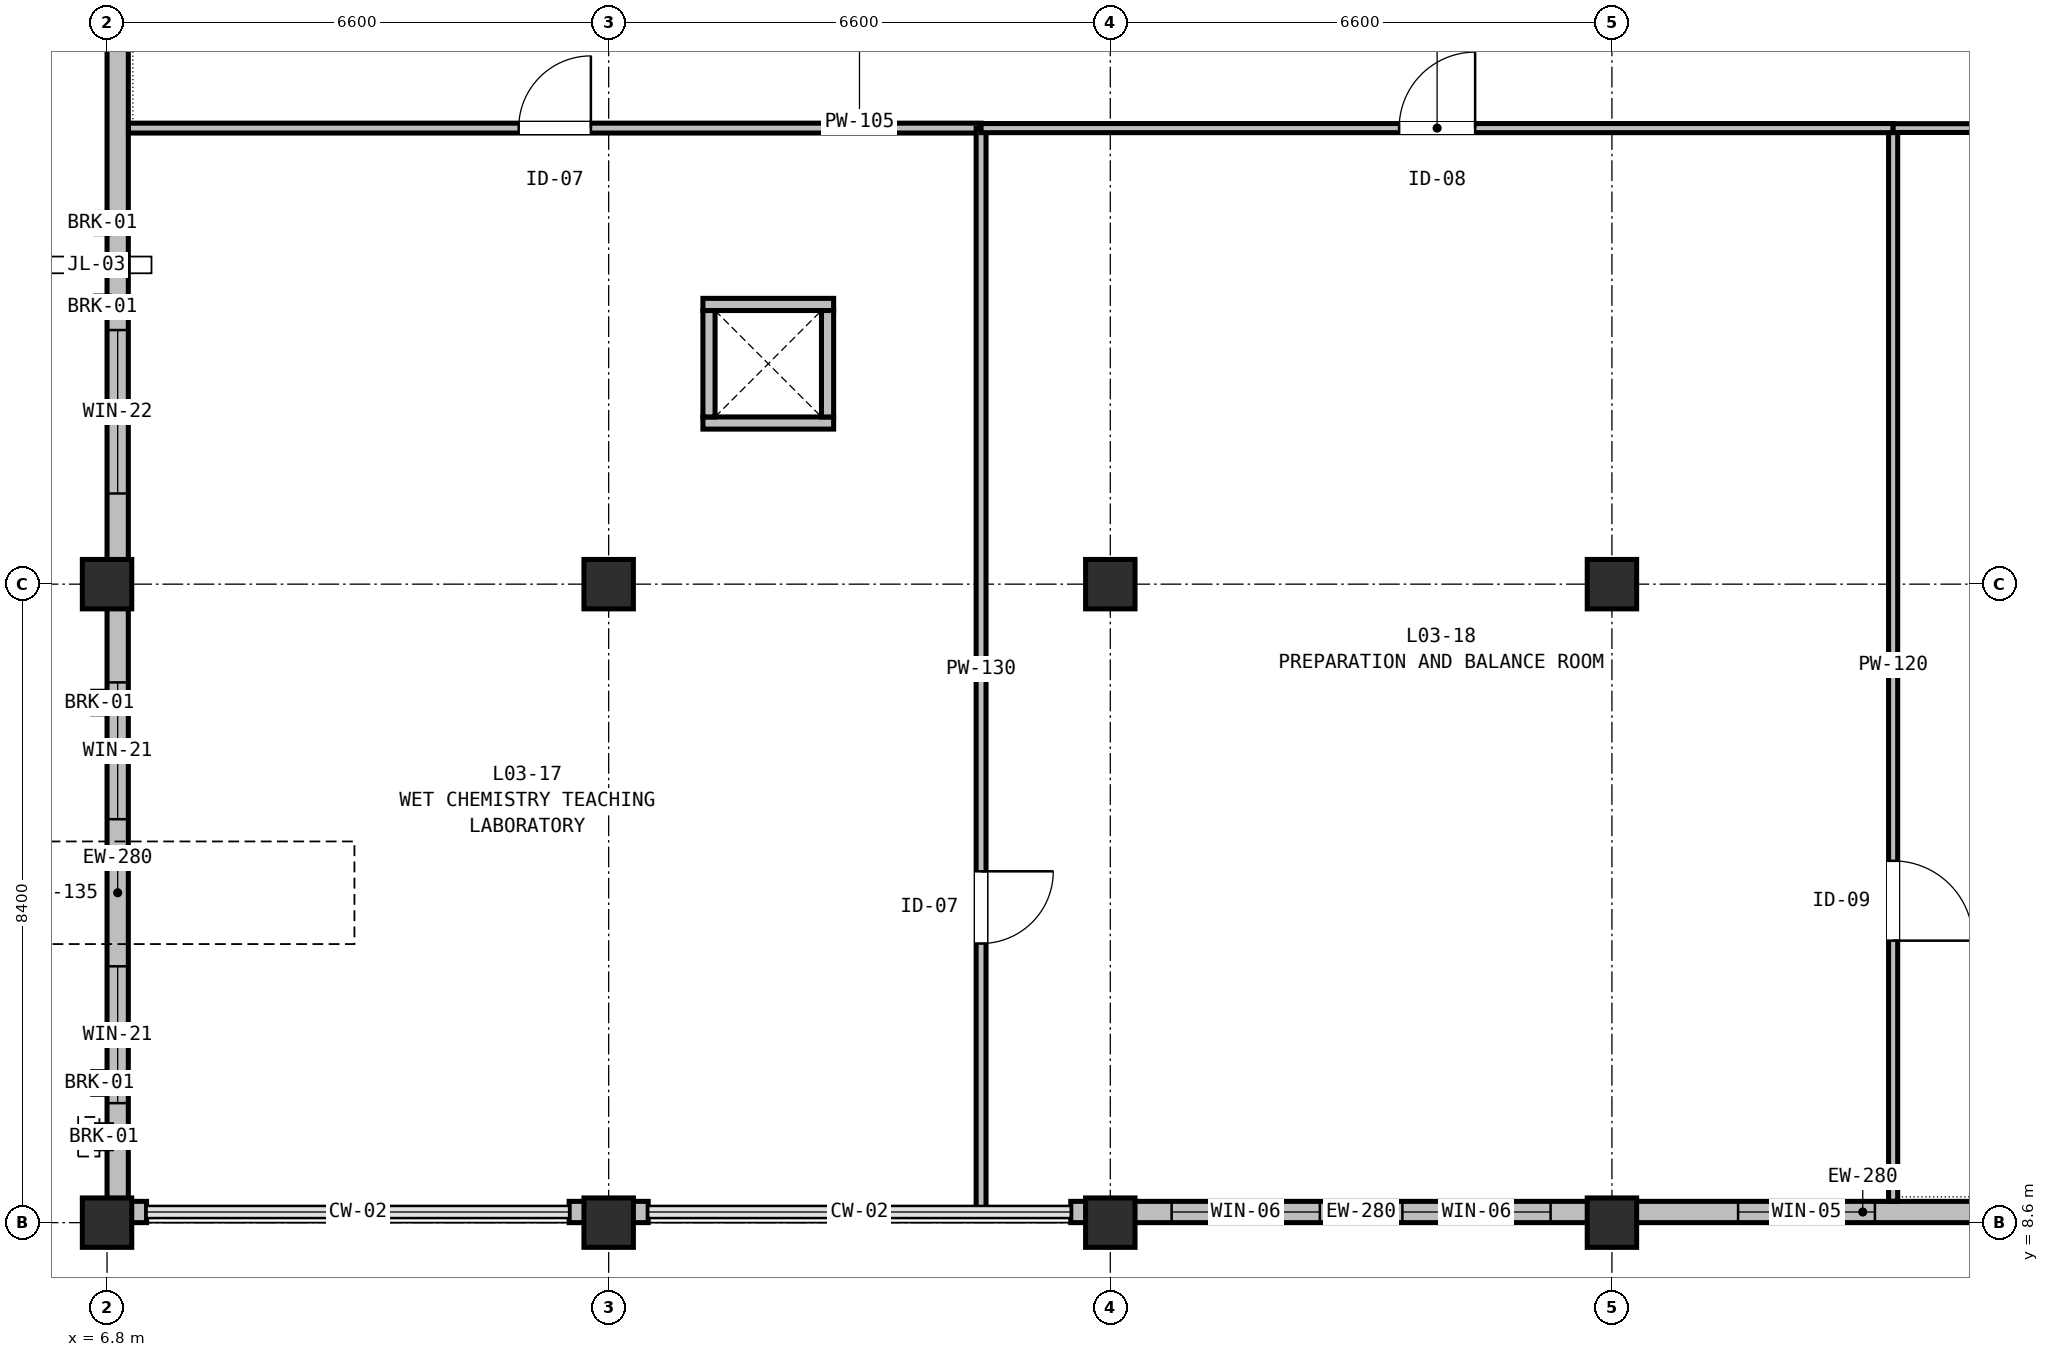
"""IFC4 building model, lengths in metres.
Left out: names, types, materials, properties, quantities, classifications, styles, units other than length and angle.
Written with IfcOpenShell. Run it as: python <this file> out.ifc"""

import sys

from ifc_helpers import new_model, si_unit, direction, frame, frame_2d, origin, origin_2d, place, context, subcontext, project, spatial, rectangle, extrude, element, fill, save


model = new_model("IFC4")
c1 = context("Model", 3, precision=1e-05, world=origin(), true_north=direction((0.0, 1.0)))
c2 = subcontext(c1, "Body", "Model", "MODEL_VIEW")
j1 = project(units=[si_unit("LENGTHUNIT", "METRE"), si_unit("PLANEANGLEUNIT", "RADIAN")], contexts=[c1])
p1 = place(None, origin())
s1 = spatial("IfcSite", under=j1, at=p1, CompositionType="ELEMENT")
p2 = place(p1, origin())
s2 = spatial("IfcBuilding", under=s1, at=p2, CompositionType="ELEMENT")
p3 = place(p2, frame((0.0, 0.0, 15.0)))
s3 = spatial("IfcBuildingStorey", under=s2, at=p3, CompositionType="ELEMENT", Elevation=15.0)
p4 = place(p3, frame((6.8, 8.6, 0.0), z_axis=(0.0, 0.0, 1.0), x_axis=(1.0, 0.0, 0.0)))
e1 = element("IfcColumn", 1, at=p4, inside=s3, PredefinedType="COLUMN", context=c2, shape_type="SweptSolid", body=[
    extrude(rectangle(XDim=0.65, YDim=0.65, at=origin_2d()), origin(), (0.0, 0.0, 1.0), 4.44),
])
p5 = place(p3, frame((6.8, 17.0, 0.0), z_axis=(0.0, 0.0, 1.0), x_axis=(1.0, 0.0, 0.0)))
e2 = element("IfcColumn", 2, at=p5, inside=s3, PredefinedType="COLUMN", context=c2, shape_type="SweptSolid", body=[
    extrude(rectangle(XDim=0.65, YDim=0.65, at=origin_2d()), origin(), (0.0, 0.0, 1.0), 4.5),
])
p6 = place(p3, frame((13.4, 8.6, 0.0), z_axis=(0.0, 0.0, 1.0), x_axis=(1.0, 0.0, 0.0)))
e3 = element("IfcColumn", 3, at=p6, inside=s3, PredefinedType="COLUMN", context=c2, shape_type="SweptSolid", body=[
    extrude(rectangle(XDim=0.65, YDim=0.65, at=origin_2d()), origin(), (0.0, 0.0, 1.0), 4.44),
])
p7 = place(p3, frame((13.4, 17.0, 0.0), z_axis=(0.0, 0.0, 1.0), x_axis=(1.0, 0.0, 0.0)))
e4 = element("IfcColumn", 4, at=p7, inside=s3, PredefinedType="COLUMN", context=c2, shape_type="SweptSolid", body=[
    extrude(rectangle(XDim=0.65, YDim=0.65, at=origin_2d()), origin(), (0.0, 0.0, 1.0), 4.5),
])
p8 = place(p3, frame((20.0, 8.6, 0.0), z_axis=(0.0, 0.0, 1.0), x_axis=(1.0, 0.0, 0.0)))
e5 = element("IfcColumn", 5, at=p8, inside=s3, PredefinedType="COLUMN", context=c2, shape_type="SweptSolid", body=[
    extrude(rectangle(XDim=0.65, YDim=0.65, at=origin_2d()), origin(), (0.0, 0.0, 1.0), 4.44),
])
p9 = place(p3, frame((20.0, 17.0, 0.0), z_axis=(0.0, 0.0, 1.0), x_axis=(1.0, 0.0, 0.0)))
e6 = element("IfcColumn", 6, at=p9, inside=s3, PredefinedType="COLUMN", context=c2, shape_type="SweptSolid", body=[
    extrude(rectangle(XDim=0.65, YDim=0.65, at=origin_2d()), origin(), (0.0, 0.0, 1.0), 4.5),
])
p10 = place(p3, frame((26.6, 8.6, 0.0), z_axis=(0.0, 0.0, 1.0), x_axis=(1.0, 0.0, 0.0)))
e7 = element("IfcColumn", 7, at=p10, inside=s3, PredefinedType="COLUMN", context=c2, shape_type="SweptSolid", body=[
    extrude(rectangle(XDim=0.65, YDim=0.65, at=origin_2d()), origin(), (0.0, 0.0, 1.0), 4.44),
])
p11 = place(p3, frame((26.6, 17.0, 0.0), z_axis=(0.0, 0.0, 1.0), x_axis=(1.0, 0.0, 0.0)))
e8 = element("IfcColumn", 8, at=p11, inside=s3, PredefinedType="COLUMN", context=c2, shape_type="SweptSolid", body=[
    extrude(rectangle(XDim=0.65, YDim=0.65, at=origin_2d()), origin(), (0.0, 0.0, 1.0), 4.5),
])
p12 = place(p3, frame((6.94, 8.88, 0.0), z_axis=(0.0, 0.0, 1.0), x_axis=(0.0, 1.0, 0.0)))
e9 = element("IfcWall", 9, at=p12, inside=s3, PredefinedType="STANDARD", context=c2, shape_type="SweptSolid", body=[
    extrude(rectangle(XDim=8.12, YDim=0.28, at=frame_2d((4.06, 0.0))), origin(), (0.0, 0.0, 1.0), 3.735),
])
p13 = place(p12, frame((1.292, 0.0, 0.75)))
e10 = element("IfcOpeningElement", 10, at=p13, cuts=e9, PredefinedType="OPENING", context=c2, shape_type="SweptSolid", body=[
    extrude(rectangle(XDim=1.8, YDim=2.4, at=frame_2d((0.9, 1.2))), frame((0.0, 0.15, 0.0), z_axis=(0.0, -1.0, 0.0), x_axis=(1.0, 0.0, 0.0)), (0.0, 0.0, 1.0), 0.3),
])
p14 = place(p12, frame((5.028, 0.0, 0.75)))
e11 = element("IfcOpeningElement", 11, at=p14, cuts=e9, PredefinedType="OPENING", context=c2, shape_type="SweptSolid", body=[
    extrude(rectangle(XDim=1.8, YDim=2.4, at=frame_2d((0.9, 1.2))), frame((0.0, 0.15, 0.0), z_axis=(0.0, -1.0, 0.0), x_axis=(1.0, 0.0, 0.0)), (0.0, 0.0, 1.0), 0.3),
])
p15 = place(p3, frame((6.94, 17.0, 0.0), z_axis=(0.0, 0.0, 1.0), x_axis=(0.0, 1.0, 0.0)))
e12 = element("IfcWall", 12, at=p15, inside=s3, PredefinedType="STANDARD", context=c2, shape_type="SweptSolid", body=[
    extrude(rectangle(XDim=8.4, YDim=0.28, at=frame_2d((4.2, 0.0))), origin(), (0.0, 0.0, 1.0), 3.735),
])
p16 = place(p15, frame((1.193, 0.0, 0.75)))
e13 = element("IfcOpeningElement", 13, at=p16, cuts=e12, PredefinedType="OPENING", context=c2, shape_type="SweptSolid", body=[
    extrude(rectangle(XDim=2.15, YDim=2.4, at=frame_2d((1.075, 1.2))), frame((0.0, 0.15, 0.0), z_axis=(0.0, -1.0, 0.0), x_axis=(1.0, 0.0, 0.0)), (0.0, 0.0, 1.0), 0.3),
])
p17 = place(p3, frame((33.2, 8.74, 0.0), z_axis=(0.0, 0.0, 1.0), x_axis=(-1.0, 0.0, 0.0)))
e14 = element("IfcWall", 14, at=p17, inside=s3, PredefinedType="STANDARD", context=c2, shape_type="SweptSolid", body=[
    extrude(rectangle(XDim=6.6, YDim=0.28, at=frame_2d((3.3, 0.0))), origin(), (0.0, 0.0, 1.0), 3.735),
])
p18 = place(p17, frame((3.14, 0.0, 0.9)))
e15 = element("IfcOpeningElement", 15, at=p18, cuts=e14, PredefinedType="OPENING", context=c2, shape_type="SweptSolid", body=[
    extrude(rectangle(XDim=1.8, YDim=2.1, at=frame_2d((0.9, 1.05))), frame((0.0, 0.15, 0.0), z_axis=(0.0, -1.0, 0.0), x_axis=(1.0, 0.0, 0.0)), (0.0, 0.0, 1.0), 0.3),
])
p19 = place(p3, frame((26.6, 8.74, 0.0), z_axis=(0.0, 0.0, 1.0), x_axis=(-1.0, 0.0, 0.0)))
e16 = element("IfcWall", 16, at=p19, inside=s3, PredefinedType="STANDARD", context=c2, shape_type="SweptSolid", body=[
    extrude(rectangle(XDim=6.6, YDim=0.28, at=frame_2d((3.3, 0.0))), origin(), (0.0, 0.0, 1.0), 3.735),
])
p20 = place(p19, frame((0.807, 0.0, 0.9)))
e17 = element("IfcOpeningElement", 17, at=p20, cuts=e16, PredefinedType="OPENING", context=c2, shape_type="SweptSolid", body=[
    extrude(rectangle(XDim=1.95, YDim=2.1, at=frame_2d((0.975, 1.05))), frame((0.0, 0.15, 0.0), z_axis=(0.0, -1.0, 0.0), x_axis=(1.0, 0.0, 0.0)), (0.0, 0.0, 1.0), 0.3),
])
p21 = place(p19, frame((3.843, 0.0, 0.9)))
e18 = element("IfcOpeningElement", 18, at=p21, cuts=e16, PredefinedType="OPENING", context=c2, shape_type="SweptSolid", body=[
    extrude(rectangle(XDim=1.95, YDim=2.1, at=frame_2d((0.975, 1.05))), frame((0.0, 0.15, 0.0), z_axis=(0.0, -1.0, 0.0), x_axis=(1.0, 0.0, 0.0)), (0.0, 0.0, 1.0), 0.3),
])
for number, where, z_axis, x_axis in (
    (19, (20.0, 8.74, 0.0), (0.0, 0.0, 1.0), (-1.0, 0.0, 0.0)),
    (20, (13.92, 8.74, 0.0), (0.0, 0.0, 1.0), (-1.0, 0.0, 0.0)),
    (21, (13.4, 8.74, 0.0), (0.0, 0.0, 1.0), (-1.0, 0.0, 0.0)),
    (22, (7.32, 8.74, 0.0), (0.0, 0.0, 1.0), (-1.0, 0.0, 0.0)),
):
    element("IfcWall", number, at=place(p3, frame(where, z_axis=z_axis, x_axis=x_axis)), inside=s3, PredefinedType="STANDARD", context=c2, shape_type="SweptSolid", body=[
        extrude(rectangle(XDim=0.52, YDim=0.28, at=frame_2d((0.26, 0.0))), origin(), (0.0, 0.0, 1.0), 3.735),
    ])
for number, where, z_axis, x_axis in (
    (23, (14.64, 19.12, 0.0), (0.0, 0.0, 1.0), (1.0, 0.0, 0.0)),
    (24, (14.64, 20.68, 0.0), (0.0, 0.0, 1.0), (1.0, 0.0, 0.0)),
):
    element("IfcWall", number, at=place(p3, frame(where, z_axis=z_axis, x_axis=x_axis)), inside=s3, PredefinedType="PARTITIONING", context=c2, shape_type="SweptSolid", body=[
        extrude(rectangle(XDim=1.72, YDim=0.16, at=frame_2d((0.86, 0.0))), origin(), (0.0, 0.0, 1.0), 4.195),
    ])
for number, where, z_axis, x_axis in (
    (25, (14.72, 19.2, 0.0), (0.0, 0.0, 1.0), (0.0, 1.0, 0.0)),
    (26, (16.28, 19.2, 0.0), (0.0, 0.0, 1.0), (0.0, 1.0, 0.0)),
):
    element("IfcWall", number, at=place(p3, frame(where, z_axis=z_axis, x_axis=x_axis)), inside=s3, PredefinedType="PARTITIONING", context=c2, shape_type="SweptSolid", body=[
        extrude(rectangle(XDim=1.4, YDim=0.16, at=frame_2d((0.7, 0.0))), origin(), (0.0, 0.0, 1.0), 4.195),
    ])
p22 = place(p3, frame((7.082, 23.0, 0.0), z_axis=(0.0, 0.0, 1.0), x_axis=(1.0, 0.0, 0.0)))
e27 = element("IfcWall", 27, at=p22, inside=s3, PredefinedType="PARTITIONING", context=c2, shape_type="SweptSolid", body=[
    extrude(rectangle(XDim=11.218, YDim=0.13, at=frame_2d((5.609, 0.0))), origin(), (0.0, 0.0, 1.0), 3.735),
])
p23 = place(p22, frame((5.134, 0.0, 0.0)))
e28 = element("IfcOpeningElement", 28, at=p23, cuts=e27, PredefinedType="OPENING", context=c2, shape_type="SweptSolid", body=[
    extrude(rectangle(XDim=0.95, YDim=2.06, at=frame_2d((0.475, 1.03))), frame((0.0, 0.075, 0.0), z_axis=(0.0, -1.0, 0.0), x_axis=(1.0, 0.0, 0.0)), (0.0, 0.0, 1.0), 0.15),
])
p24 = place(p3, frame((18.3, 23.0, 0.0), z_axis=(0.0, 0.0, 1.0), x_axis=(0.0, -1.0, 0.0)))
e29 = element("IfcWall", 29, at=p24, inside=s3, PredefinedType="PARTITIONING", context=c2, shape_type="SweptSolid", body=[
    extrude(rectangle(XDim=14.24, YDim=0.13, at=frame_2d((7.12, 0.0))), origin(), (0.0, 0.0, 1.0), 3.735),
])
p25 = place(p24, frame((9.778, 0.0, 0.0)))
e30 = element("IfcOpeningElement", 30, at=p25, cuts=e29, PredefinedType="OPENING", context=c2, shape_type="SweptSolid", body=[
    extrude(rectangle(XDim=0.95, YDim=2.06, at=frame_2d((0.475, 1.03))), frame((0.0, 0.075, 0.0), z_axis=(0.0, -1.0, 0.0), x_axis=(1.0, 0.0, 0.0)), (0.0, 0.0, 1.0), 0.15),
])
p26 = place(p3, frame((30.3, 23.0, 0.0), z_axis=(0.0, 0.0, 1.0), x_axis=(0.0, -1.0, 0.0)))
e31 = element("IfcWall", 31, at=p26, inside=s3, PredefinedType="PARTITIONING", context=c2, shape_type="SweptSolid", body=[
    extrude(rectangle(XDim=14.118, YDim=0.12, at=frame_2d((7.059, 0.0))), origin(), (0.0, 0.0, 1.0), 3.735),
])
p27 = place(p26, frame((9.64, 0.0, 0.0)))
e32 = element("IfcOpeningElement", 32, at=p27, cuts=e31, PredefinedType="OPENING", context=c2, shape_type="SweptSolid", body=[
    extrude(rectangle(XDim=1.05, YDim=2.06, at=frame_2d((0.525, 1.03))), frame((0.0, 0.07, 0.0), z_axis=(0.0, -1.0, 0.0), x_axis=(1.0, 0.0, 0.0)), (0.0, 0.0, 1.0), 0.14),
])
p28 = place(p3, frame((18.3, 23.0, 0.0), z_axis=(0.0, 0.0, 1.0), x_axis=(1.0, 0.0, 0.0)))
e33 = element("IfcWall", 33, at=p28, inside=s3, PredefinedType="PARTITIONING", context=c2, shape_type="SweptSolid", body=[
    extrude(rectangle(XDim=12.0, YDim=0.12, at=frame_2d((6.0, 0.0))), origin(), (0.0, 0.0, 1.0), 3.735),
])
p29 = place(p28, frame((5.5, 0.0, 0.0)))
e34 = element("IfcOpeningElement", 34, at=p29, cuts=e33, PredefinedType="OPENING", context=c2, shape_type="SweptSolid", body=[
    extrude(rectangle(XDim=1.0, YDim=2.06, at=frame_2d((0.5, 1.03))), frame((0.0, 0.07, 0.0), z_axis=(0.0, -1.0, 0.0), x_axis=(1.0, 0.0, 0.0)), (0.0, 0.0, 1.0), 0.14),
])
p30 = place(p3, frame((30.3, 23.0, 0.0), z_axis=(0.0, 0.0, 1.0), x_axis=(1.0, 0.0, 0.0)))
e35 = element("IfcWall", 35, at=p30, inside=s3, PredefinedType="PARTITIONING", context=c2, shape_type="SweptSolid", body=[
    extrude(rectangle(XDim=9.218, YDim=0.115, at=frame_2d((4.609, 0.0))), origin(), (0.0, 0.0, 1.0), 3.735),
])
p31 = place(p30, frame((4.084, 0.0, 0.0)))
e36 = element("IfcOpeningElement", 36, at=p31, cuts=e35, PredefinedType="OPENING", context=c2, shape_type="SweptSolid", body=[
    extrude(rectangle(XDim=1.05, YDim=2.06, at=frame_2d((0.525, 1.03))), frame((0.0, 0.067, 0.0), z_axis=(0.0, -1.0, 0.0), x_axis=(1.0, 0.0, 0.0)), (0.0, 0.0, 1.0), 0.135),
])
p32 = place(p13, origin())
e37 = element("IfcWindow", 37, at=p32, inside=s3, PartitioningType="SINGLE_PANEL", PredefinedType="WINDOW", context=c2, shape_type="SweptSolid", body=[
    extrude(rectangle(XDim=1.8, YDim=2.4, at=frame_2d((0.9, 1.2))), frame((0.0, 0.03, 0.0), z_axis=(0.0, -1.0, 0.0), x_axis=(1.0, 0.0, 0.0)), (0.0, 0.0, 1.0), 0.06),
])
fill(e10, e37)
p33 = place(p14, origin())
e38 = element("IfcWindow", 38, at=p33, inside=s3, PartitioningType="SINGLE_PANEL", PredefinedType="WINDOW", context=c2, shape_type="SweptSolid", body=[
    extrude(rectangle(XDim=1.8, YDim=2.4, at=frame_2d((0.9, 1.2))), frame((0.0, 0.03, 0.0), z_axis=(0.0, -1.0, 0.0), x_axis=(1.0, 0.0, 0.0)), (0.0, 0.0, 1.0), 0.06),
])
fill(e11, e38)
p34 = place(p16, origin())
e39 = element("IfcWindow", 39, at=p34, inside=s3, PartitioningType="SINGLE_PANEL", PredefinedType="WINDOW", context=c2, shape_type="SweptSolid", body=[
    extrude(rectangle(XDim=2.15, YDim=2.4, at=frame_2d((1.075, 1.2))), frame((0.0, 0.03, 0.0), z_axis=(0.0, -1.0, 0.0), x_axis=(1.0, 0.0, 0.0)), (0.0, 0.0, 1.0), 0.06),
])
fill(e13, e39)
p35 = place(p18, origin())
e40 = element("IfcWindow", 40, at=p35, inside=s3, PartitioningType="SINGLE_PANEL", PredefinedType="WINDOW", context=c2, shape_type="SweptSolid", body=[
    extrude(rectangle(XDim=1.8, YDim=2.1, at=frame_2d((0.9, 1.05))), frame((0.0, 0.03, 0.0), z_axis=(0.0, -1.0, 0.0), x_axis=(1.0, 0.0, 0.0)), (0.0, 0.0, 1.0), 0.06),
])
fill(e15, e40)
p36 = place(p20, origin())
e41 = element("IfcWindow", 41, at=p36, inside=s3, PartitioningType="SINGLE_PANEL", PredefinedType="WINDOW", context=c2, shape_type="SweptSolid", body=[
    extrude(rectangle(XDim=1.95, YDim=2.1, at=frame_2d((0.975, 1.05))), frame((0.0, 0.03, 0.0), z_axis=(0.0, -1.0, 0.0), x_axis=(1.0, 0.0, 0.0)), (0.0, 0.0, 1.0), 0.06),
])
fill(e17, e41)
p37 = place(p21, origin())
e42 = element("IfcWindow", 42, at=p37, inside=s3, PartitioningType="SINGLE_PANEL", PredefinedType="WINDOW", context=c2, shape_type="SweptSolid", body=[
    extrude(rectangle(XDim=1.95, YDim=2.1, at=frame_2d((0.975, 1.05))), frame((0.0, 0.03, 0.0), z_axis=(0.0, -1.0, 0.0), x_axis=(1.0, 0.0, 0.0)), (0.0, 0.0, 1.0), 0.06),
])
fill(e18, e42)
p38 = place(p23, origin())
e43 = element("IfcDoor", 43, at=p38, inside=s3, OperationType="SINGLE_SWING_RIGHT", PredefinedType="DOOR", context=c2, shape_type="SweptSolid", body=[
    extrude(rectangle(XDim=0.95, YDim=2.06, at=frame_2d((0.475, 1.03))), frame((0.0, 0.025, 0.0), z_axis=(0.0, -1.0, 0.0), x_axis=(1.0, 0.0, 0.0)), (0.0, 0.0, 1.0), 0.05),
])
fill(e28, e43)
p39 = place(p25, origin())
e44 = element("IfcDoor", 44, at=p39, inside=s3, OperationType="SINGLE_SWING_LEFT", PredefinedType="DOOR", context=c2, shape_type="SweptSolid", body=[
    extrude(rectangle(XDim=0.95, YDim=2.06, at=frame_2d((0.475, 1.03))), frame((0.0, 0.025, 0.0), z_axis=(0.0, -1.0, 0.0), x_axis=(1.0, 0.0, 0.0)), (0.0, 0.0, 1.0), 0.05),
])
fill(e30, e44)
p40 = place(p29, origin())
e45 = element("IfcDoor", 45, at=p40, inside=s3, OperationType="SINGLE_SWING_RIGHT", PredefinedType="DOOR", context=c2, shape_type="SweptSolid", body=[
    extrude(rectangle(XDim=1.0, YDim=2.06, at=frame_2d((0.5, 1.03))), frame((0.0, 0.025, 0.0), z_axis=(0.0, -1.0, 0.0), x_axis=(1.0, 0.0, 0.0)), (0.0, 0.0, 1.0), 0.05),
])
fill(e34, e45)
p41 = place(p27, origin())
e46 = element("IfcDoor", 46, at=p41, inside=s3, OperationType="SINGLE_SWING_RIGHT", PredefinedType="DOOR", context=c2, shape_type="SweptSolid", body=[
    extrude(rectangle(XDim=1.05, YDim=2.06, at=frame_2d((0.525, 1.03))), frame((0.0, 0.025, 0.0), z_axis=(0.0, -1.0, 0.0), x_axis=(1.0, 0.0, 0.0)), (0.0, 0.0, 1.0), 0.05),
])
fill(e32, e46)
save(model, sys.argv[1])
